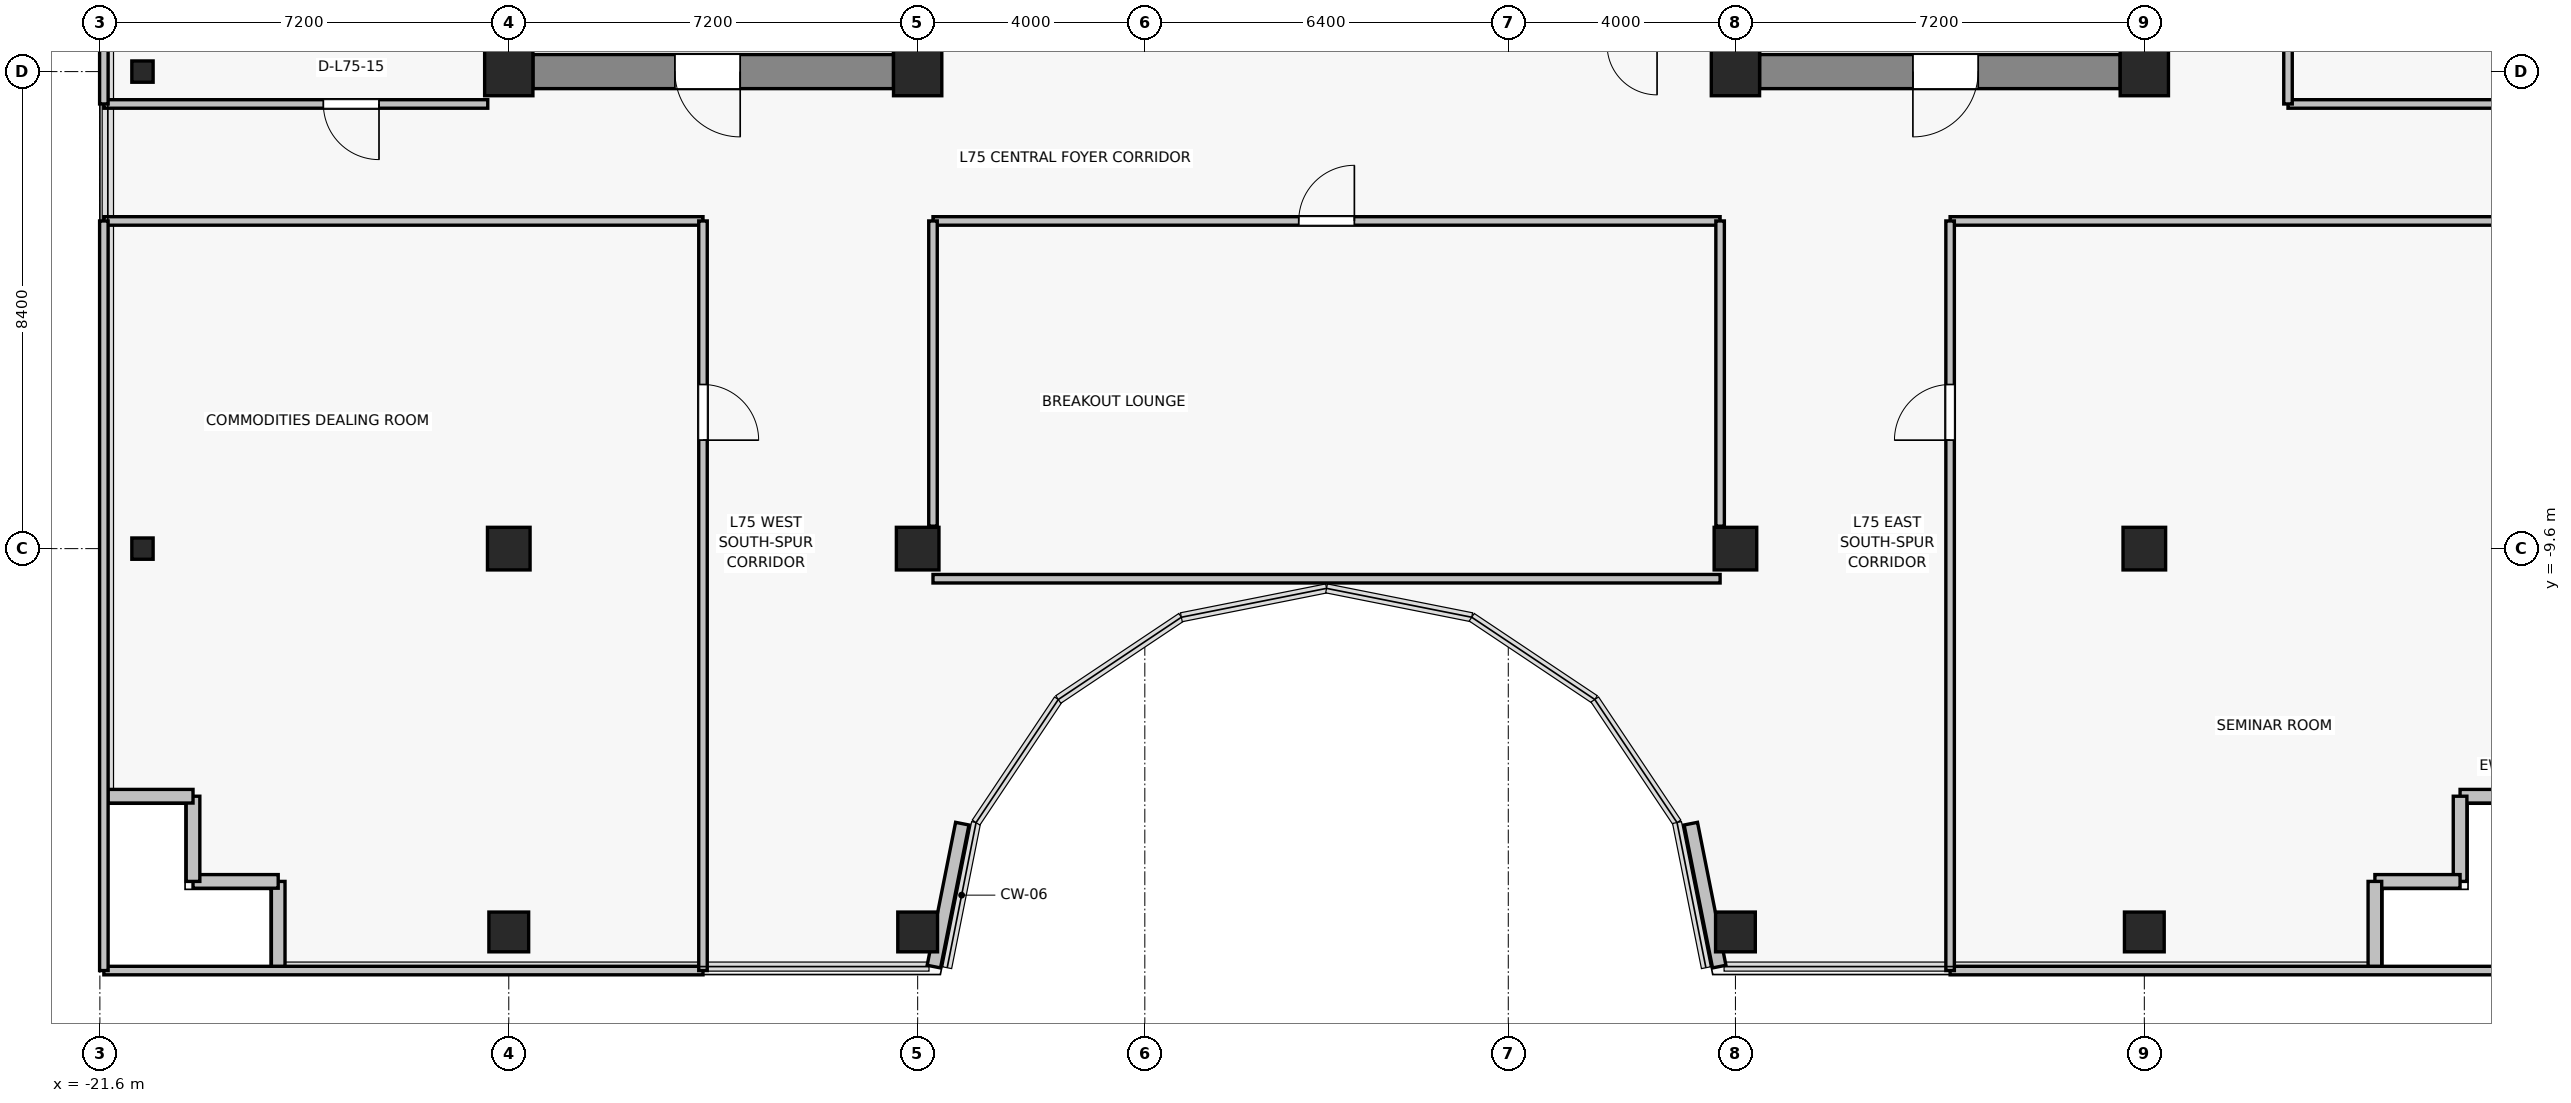
"""IFC4 building model, lengths in metres.
Left out: names, types, materials, properties, quantities, classifications, styles, units other than length and angle.
Written with IfcOpenShell. Run it as: python <this file> out.ifc"""

import sys

from ifc_helpers import new_model, si_unit, direction, frame, frame_2d, origin, origin_2d, place, context, subcontext, project, spatial, rectangle, i_section, extrude, source, transform, mapped, element, fill, save


model = new_model("IFC4")
c1 = context("Model", 3, precision=1e-05, world=origin(), true_north=direction((0.0, 1.0)))
c2 = subcontext(c1, "Body", "Model", "MODEL_VIEW")
j1 = project(units=[si_unit("LENGTHUNIT", "METRE"), si_unit("PLANEANGLEUNIT", "RADIAN")], contexts=[c1])
p1 = place(None, origin())
s1 = spatial("IfcSite", under=j1, at=p1, CompositionType="ELEMENT")
p2 = place(p1, origin())
s2 = spatial("IfcBuilding", under=s1, at=p2, CompositionType="ELEMENT")
p3 = place(p2, frame((0.0, 0.0, 265.0)))
s3 = spatial("IfcBuildingStorey", under=s2, at=p3, CompositionType="ELEMENT", Elevation=265.0)
for number, where, z_axis, x_axis in (
    (1, (-14.4, -1.2, 0.0), (0.0, 0.0, 1.0), (1.0, 0.0, 0.0)),
    (2, (-7.2, -1.2, 0.0), (0.0, 0.0, 1.0), (1.0, 0.0, 0.0)),
    (3, (7.2, -1.2, 0.0), (0.0, 0.0, 1.0), (1.0, 0.0, 0.0)),
    (4, (14.4, -1.2, 0.0), (0.0, 0.0, 1.0), (1.0, 0.0, 0.0)),
):
    element("IfcColumn", number, at=place(p3, frame(where, z_axis=z_axis, x_axis=x_axis)), inside=s3, PredefinedType="COLUMN", context=c2, shape_type="SweptSolid", body=[
        extrude(rectangle(XDim=0.85, YDim=0.85, at=origin_2d()), origin(), (0.0, 0.0, 1.0), 3.3),
    ])
for number, where, z_axis, x_axis in (
    (5, (-14.4, -9.6, 0.0), (0.0, 0.0, 1.0), (1.0, 0.0, 0.0)),
    (6, (-7.2, -9.6, 0.0), (0.0, 0.0, 1.0), (1.0, 0.0, 0.0)),
    (7, (7.2, -9.6, 0.0), (0.0, 0.0, 1.0), (1.0, 0.0, 0.0)),
    (8, (14.4, -9.6, 0.0), (0.0, 0.0, 1.0), (1.0, 0.0, 0.0)),
):
    element("IfcColumn", number, at=place(p3, frame(where, z_axis=z_axis, x_axis=x_axis)), inside=s3, PredefinedType="COLUMN", context=c2, shape_type="SweptSolid", body=[
        extrude(rectangle(XDim=0.75, YDim=0.75, at=origin_2d()), origin(), (0.0, 0.0, 1.0), 3.3),
    ])
for number, where, z_axis, x_axis in (
    (9, (-14.4, -16.35, 0.0), (0.0, 0.0, 1.0), (1.0, 0.0, 0.0)),
    (10, (-7.2, -16.35, 0.0), (0.0, 0.0, 1.0), (1.0, 0.0, 0.0)),
    (11, (7.2, -16.35, 0.0), (0.0, 0.0, 1.0), (1.0, 0.0, 0.0)),
    (12, (14.4, -16.35, 0.0), (0.0, 0.0, 1.0), (1.0, 0.0, 0.0)),
):
    element("IfcColumn", number, at=place(p3, frame(where, z_axis=z_axis, x_axis=x_axis)), inside=s3, PredefinedType="COLUMN", context=c2, shape_type="SweptSolid", body=[
        extrude(rectangle(XDim=0.7, YDim=0.7, at=origin_2d()), origin(), (0.0, 0.0, 1.0), 3.3),
    ])
for number, where, z_axis, x_axis in (
    (13, (-20.85, -9.6, 0.0), (0.0, 0.0, 1.0), (1.0, 0.0, 0.0)),
    (14, (-20.85, -1.2, 0.0), (0.0, 0.0, 1.0), (1.0, 0.0, 0.0)),
):
    element("IfcColumn", number, at=place(p3, frame(where, z_axis=z_axis, x_axis=x_axis)), inside=s3, PredefinedType="COLUMN", context=c2, shape_type="SweptSolid", body=[
        extrude(i_section(OverallWidth=0.375, OverallDepth=0.375, WebThickness=0.017, FlangeThickness=0.027, FilletRadius=0.015, at=origin_2d()), origin(), (0.0, 0.0, 1.0), 3.3),
    ])
p4 = place(p3, frame((-7.625, -1.2, 0.0), z_axis=(0.0, 0.0, 1.0), x_axis=(-1.0, 0.0, 0.0)))
e15 = element("IfcWall", 15, at=p4, inside=s3, PredefinedType="SHEAR", context=c2, shape_type="SweptSolid", body=[
    extrude(rectangle(XDim=6.35, YDim=0.6, at=frame_2d((3.175, 0.0))), origin(), (0.0, 0.0, 1.0), 3.075),
])
p5 = place(p4, frame((2.7, 0.0, 0.0)))
e16 = element("IfcOpeningElement", 16, at=p5, cuts=e15, PredefinedType="OPENING", context=c2, shape_type="SweptSolid", body=[
    extrude(rectangle(XDim=1.15, YDim=2.15, at=frame_2d((0.575, 1.075))), frame((0.0, 0.31, 0.0), z_axis=(0.0, -1.0, 0.0), x_axis=(1.0, 0.0, 0.0)), (0.0, 0.0, 1.0), 0.62),
])
p6 = place(p3, frame((13.975, -1.2, 0.0), z_axis=(0.0, 0.0, 1.0), x_axis=(-1.0, 0.0, 0.0)))
e17 = element("IfcWall", 17, at=p6, inside=s3, PredefinedType="SHEAR", context=c2, shape_type="SweptSolid", body=[
    extrude(rectangle(XDim=6.35, YDim=0.6, at=frame_2d((3.175, 0.0))), origin(), (0.0, 0.0, 1.0), 3.075),
])
p7 = place(p6, frame((2.5, 0.0, 0.0)))
e18 = element("IfcOpeningElement", 18, at=p7, cuts=e17, PredefinedType="OPENING", context=c2, shape_type="SweptSolid", body=[
    extrude(rectangle(XDim=1.15, YDim=2.15, at=frame_2d((0.575, 1.075))), frame((0.0, 0.31, 0.0), z_axis=(0.0, -1.0, 0.0), x_axis=(1.0, 0.0, 0.0)), (0.0, 0.0, 1.0), 0.62),
])
for number, where, z_axis, x_axis in (
    (19, (-7.4, -0.9, 0.0), (0.0, 0.0, 1.0), (0.0, 1.0, 0.0)),
    (20, (7.4, -0.9, 0.0), (0.0, 0.0, 1.0), (0.0, 1.0, 0.0)),
):
    element("IfcWall", number, at=place(p3, frame(where, z_axis=z_axis, x_axis=x_axis)), inside=s3, PredefinedType="SHEAR", context=c2, shape_type="SweptSolid", body=[
        extrude(rectangle(XDim=4.15, YDim=0.45, at=frame_2d((2.075, 0.0))), origin(), (0.0, 0.0, 1.0), 3.075),
    ])
for number, where, z_axis, x_axis in (
    (21, (19.96, -13.96, 0.0), (0.0, 0.0, 1.0), (1.0, 0.0, 0.0)),
    (22, (19.96, -15.46, 0.0), (0.0, 0.0, 1.0), (0.0, 1.0, 0.0)),
    (23, (18.46, -15.46, 0.0), (0.0, 0.0, 1.0), (1.0, 0.0, 0.0)),
    (24, (18.46, -16.96, 0.0), (0.0, 0.0, 1.0), (0.0, 1.0, 0.0)),
):
    element("IfcWall", number, at=place(p3, frame(where, z_axis=z_axis, x_axis=x_axis)), inside=s3, PredefinedType="SOLIDWALL", context=c2, shape_type="SweptSolid", body=[
        extrude(rectangle(XDim=1.5, YDim=0.24, at=frame_2d((0.75, 0.0))), origin(), (0.0, 0.0, 1.0), 3.075),
    ])
for number, where, z_axis, x_axis in (
    (25, (6.414, -14.443, 0.0), (0.0, 0.0, 1.0), (0.195, -0.981, 0.0)),
    (26, (-6.915, -16.96, 0.0), (0.0, 0.0, 1.0), (0.195, 0.981, 0.0)),
):
    element("IfcWall", number, at=place(p3, frame(where, z_axis=z_axis, x_axis=x_axis)), inside=s3, PredefinedType="SOLIDWALL", context=c2, shape_type="SweptSolid", body=[
        extrude(rectangle(XDim=2.566, YDim=0.24, at=frame_2d((1.283, 0.0))), origin(), (0.0, 0.0, 1.0), 3.075),
    ])
for number, where, z_axis, x_axis in (
    (27, (-18.46, -15.46, 0.0), (0.0, 0.0, 1.0), (0.0, -1.0, 0.0)),
    (28, (-19.96, -15.46, 0.0), (0.0, 0.0, 1.0), (1.0, 0.0, 0.0)),
    (29, (-19.96, -13.96, 0.0), (0.0, 0.0, 1.0), (0.0, -1.0, 0.0)),
    (30, (-21.46, -13.96, 0.0), (0.0, 0.0, 1.0), (1.0, 0.0, 0.0)),
):
    element("IfcWall", number, at=place(p3, frame(where, z_axis=z_axis, x_axis=x_axis)), inside=s3, PredefinedType="SOLIDWALL", context=c2, shape_type="SweptSolid", body=[
        extrude(rectangle(XDim=1.5, YDim=0.24, at=frame_2d((0.75, 0.0))), origin(), (0.0, 0.0, 1.0), 3.075),
    ])
p8 = place(p3, frame((-10.98, -17.03, 0.0), z_axis=(0.0, 0.0, 1.0), x_axis=(-1.0, 0.0, 0.0)))
e31 = element("IfcWall", 31, at=p8, inside=s3, PredefinedType="PARTITIONING", context=c2, shape_type="SweptSolid", body=[
    extrude(rectangle(XDim=10.55, YDim=0.15, at=frame_2d((5.275, 0.0))), origin(), (0.0, 0.0, 1.0), 3.075),
])
p9 = place(p3, frame((-21.53, -3.83, 0.0), z_axis=(0.0, 0.0, 1.0), x_axis=(1.0, 0.0, 0.0)))
e32 = element("IfcWall", 32, at=p9, inside=s3, PredefinedType="PARTITIONING", context=c2, shape_type="SweptSolid", body=[
    extrude(rectangle(XDim=10.55, YDim=0.15, at=frame_2d((5.275, 0.0))), origin(), (0.0, 0.0, 1.0), 2.615),
])
p10 = place(p3, frame((-21.53, -17.03, 0.0), z_axis=(0.0, 0.0, 1.0), x_axis=(0.0, 1.0, 0.0)))
e33 = element("IfcWall", 33, at=p10, inside=s3, PredefinedType="PARTITIONING", context=c2, shape_type="SweptSolid", body=[
    extrude(rectangle(XDim=13.2, YDim=0.15, at=frame_2d((6.6, 0.0))), origin(), (0.0, 0.0, 1.0), 2.665),
])
p11 = place(p3, frame((-10.98, -3.83, 0.0), z_axis=(0.0, 0.0, 1.0), x_axis=(0.0, -1.0, 0.0)))
e34 = element("IfcWall", 34, at=p11, inside=s3, PredefinedType="PARTITIONING", context=c2, shape_type="SweptSolid", body=[
    extrude(rectangle(XDim=13.2, YDim=0.15, at=frame_2d((6.6, 0.0))), origin(), (0.0, 0.0, 1.0), 2.615),
])
p12 = place(p11, frame((2.88, 0.0, 0.0)))
e35 = element("IfcOpeningElement", 35, at=p12, cuts=e34, PredefinedType="OPENING", context=c2, shape_type="SweptSolid", body=[
    extrude(rectangle(XDim=0.98, YDim=2.15, at=frame_2d((0.49, 1.075))), frame((0.0, 0.085, 0.0), z_axis=(0.0, -1.0, 0.0), x_axis=(1.0, 0.0, 0.0)), (0.0, 0.0, 1.0), 0.17),
])
p13 = place(p3, frame((21.53, -17.03, 0.0), z_axis=(0.0, 0.0, 1.0), x_axis=(-1.0, 0.0, 0.0)))
e36 = element("IfcWall", 36, at=p13, inside=s3, PredefinedType="PARTITIONING", context=c2, shape_type="SweptSolid", body=[
    extrude(rectangle(XDim=10.55, YDim=0.15, at=frame_2d((5.275, 0.0))), origin(), (0.0, 0.0, 1.0), 3.075),
])
p14 = place(p3, frame((10.98, -3.83, 0.0), z_axis=(0.0, 0.0, 1.0), x_axis=(1.0, 0.0, 0.0)))
e37 = element("IfcWall", 37, at=p14, inside=s3, PredefinedType="PARTITIONING", context=c2, shape_type="SweptSolid", body=[
    extrude(rectangle(XDim=10.55, YDim=0.15, at=frame_2d((5.275, 0.0))), origin(), (0.0, 0.0, 1.0), 2.615),
])
p15 = place(p3, frame((10.98, -17.03, 0.0), z_axis=(0.0, 0.0, 1.0), x_axis=(0.0, 1.0, 0.0)))
e38 = element("IfcWall", 38, at=p15, inside=s3, PredefinedType="PARTITIONING", context=c2, shape_type="SweptSolid", body=[
    extrude(rectangle(XDim=13.2, YDim=0.15, at=frame_2d((6.6, 0.0))), origin(), (0.0, 0.0, 1.0), 2.615),
])
p16 = place(p15, frame((9.34, 0.0, 0.0)))
e39 = element("IfcOpeningElement", 39, at=p16, cuts=e38, PredefinedType="OPENING", context=c2, shape_type="SweptSolid", body=[
    extrude(rectangle(XDim=0.98, YDim=2.15, at=frame_2d((0.49, 1.075))), frame((0.0, 0.085, 0.0), z_axis=(0.0, -1.0, 0.0), x_axis=(1.0, 0.0, 0.0)), (0.0, 0.0, 1.0), 0.17),
])
p17 = place(p3, frame((6.93, -10.13, 0.0), z_axis=(0.0, 0.0, 1.0), x_axis=(-1.0, 0.0, 0.0)))
e40 = element("IfcWall", 40, at=p17, inside=s3, PredefinedType="PARTITIONING", context=c2, shape_type="SweptSolid", body=[
    extrude(rectangle(XDim=13.86, YDim=0.15, at=frame_2d((6.93, 0.0))), origin(), (0.0, 0.0, 1.0), 2.615),
])
p18 = place(p3, frame((-6.93, -3.83, 0.0), z_axis=(0.0, 0.0, 1.0), x_axis=(1.0, 0.0, 0.0)))
e41 = element("IfcWall", 41, at=p18, inside=s3, PredefinedType="PARTITIONING", context=c2, shape_type="SweptSolid", body=[
    extrude(rectangle(XDim=13.86, YDim=0.15, at=frame_2d((6.93, 0.0))), origin(), (0.0, 0.0, 1.0), 2.615),
])
p19 = place(p18, frame((6.44, 0.0, 0.0)))
e42 = element("IfcOpeningElement", 42, at=p19, cuts=e41, PredefinedType="OPENING", context=c2, shape_type="SweptSolid", body=[
    extrude(rectangle(XDim=0.98, YDim=2.15, at=frame_2d((0.49, 1.075))), frame((0.0, 0.085, 0.0), z_axis=(0.0, -1.0, 0.0), x_axis=(1.0, 0.0, 0.0)), (0.0, 0.0, 1.0), 0.17),
])
for number, where, z_axis, x_axis in (
    (43, (-6.93, -9.205, 0.0), (0.0, 0.0, 1.0), (0.0, 1.0, 0.0)),
    (44, (6.93, -3.83, 0.0), (0.0, 0.0, 1.0), (0.0, -1.0, 0.0)),
):
    element("IfcWall", number, at=place(p3, frame(where, z_axis=z_axis, x_axis=x_axis)), inside=s3, PredefinedType="PARTITIONING", context=c2, shape_type="SweptSolid", body=[
        extrude(rectangle(XDim=5.375, YDim=0.15, at=frame_2d((2.688, 0.0))), origin(), (0.0, 0.0, 1.0), 2.615),
    ])
p20 = place(p3, frame((-14.77, -1.77, 0.0), z_axis=(0.0, 0.0, 1.0), x_axis=(-1.0, 0.0, 0.0)))
e45 = element("IfcWall", 45, at=p20, inside=s3, PredefinedType="PARTITIONING", context=c2, shape_type="SweptSolid", body=[
    extrude(rectangle(XDim=6.76, YDim=0.15, at=frame_2d((3.38, 0.0))), origin(), (0.0, 0.0, 1.0), 2.765),
])
p21 = place(p20, frame((1.915, 0.0, 0.0)))
e46 = element("IfcOpeningElement", 46, at=p21, cuts=e45, PredefinedType="OPENING", context=c2, shape_type="SweptSolid", body=[
    extrude(rectangle(XDim=0.98, YDim=2.15, at=frame_2d((0.49, 1.075))), frame((0.0, 0.085, 0.0), z_axis=(0.0, -1.0, 0.0), x_axis=(1.0, 0.0, 0.0)), (0.0, 0.0, 1.0), 0.17),
])
p22 = place(p3, frame((-21.53, -1.77, 0.0), z_axis=(0.0, 0.0, 1.0), x_axis=(0.0, 1.0, 0.0)))
e47 = element("IfcWall", 47, at=p22, inside=s3, PredefinedType="PARTITIONING", context=c2, shape_type="SweptSolid", body=[
    extrude(rectangle(XDim=15.65, YDim=0.15, at=frame_2d((7.825, 0.0))), origin(), (0.0, 0.0, 1.0), 3.075),
])
p23 = place(p3, frame((21.53, -1.77, 0.0), z_axis=(0.0, 0.0, 1.0), x_axis=(-1.0, 0.0, 0.0)))
e48 = element("IfcWall", 48, at=p23, inside=s3, PredefinedType="PARTITIONING", context=c2, shape_type="SweptSolid", body=[
    extrude(rectangle(XDim=4.6, YDim=0.15, at=frame_2d((2.3, 0.0))), origin(), (0.0, 0.0, 1.0), 2.765),
])
p24 = place(p3, frame((16.93, -1.77, 0.0), z_axis=(0.0, 0.0, 1.0), x_axis=(0.0, 1.0, 0.0)))
e49 = element("IfcWall", 49, at=p24, inside=s3, PredefinedType="PARTITIONING", context=c2, shape_type="SweptSolid", body=[
    extrude(rectangle(XDim=15.65, YDim=0.15, at=frame_2d((7.825, 0.0))), origin(), (0.0, 0.0, 1.0), 2.615),
])
p25 = place(p24, frame((7.335, 0.0, 0.0)))
e50 = element("IfcOpeningElement", 50, at=p25, cuts=e49, PredefinedType="OPENING", context=c2, shape_type="SweptSolid", body=[
    extrude(rectangle(XDim=0.98, YDim=2.15, at=frame_2d((0.49, 1.075))), frame((0.0, 0.085, 0.0), z_axis=(0.0, -1.0, 0.0), x_axis=(1.0, 0.0, 0.0)), (0.0, 0.0, 1.0), 0.17),
])
m1 = source(origin(), c2, "Body", "SweptSolid", [
    extrude(rectangle(XDim=1.15, YDim=2.15, at=frame_2d((0.575, 1.075))), frame((0.0, 0.025, 0.0), z_axis=(0.0, -1.0, 0.0), x_axis=(1.0, 0.0, 0.0)), (0.0, 0.0, 1.0), 0.05),
])
p26 = place(p5, origin())
e51 = element("IfcDoor", 51, at=p26, inside=s3, OperationType="SINGLE_SWING_LEFT", PredefinedType="DOOR", context=c2, shape_type="MappedRepresentation", body=[
    mapped(m1, transform((0.0, 0.0, 0.0), x_axis=(1.0, 0.0, 0.0), y_axis=(0.0, 1.0, 0.0), z_axis=(0.0, 0.0, 1.0), scale=1.0)),
])
fill(e16, e51)
p27 = place(p7, origin())
e52 = element("IfcDoor", 52, at=p27, inside=s3, OperationType="SINGLE_SWING_RIGHT", PredefinedType="DOOR", context=c2, shape_type="MappedRepresentation", body=[
    mapped(m1, transform((0.0, 0.0, 0.0), x_axis=(1.0, 0.0, 0.0), y_axis=(0.0, 1.0, 0.0), z_axis=(0.0, 0.0, 1.0), scale=1.0)),
])
fill(e18, e52)
m2 = source(origin(), c2, "Body", "SweptSolid", [
    extrude(rectangle(XDim=0.98, YDim=2.15, at=frame_2d((0.49, 1.075))), frame((0.0, 0.025, 0.0), z_axis=(0.0, -1.0, 0.0), x_axis=(1.0, 0.0, 0.0)), (0.0, 0.0, 1.0), 0.05),
])
p28 = place(p12, origin())
e53 = element("IfcDoor", 53, at=p28, inside=s3, OperationType="SINGLE_SWING_RIGHT", PredefinedType="DOOR", context=c2, shape_type="MappedRepresentation", body=[
    mapped(m2, transform((0.0, 0.0, 0.0), x_axis=(1.0, 0.0, 0.0), y_axis=(0.0, 1.0, 0.0), z_axis=(0.0, 0.0, 1.0), scale=1.0)),
])
fill(e35, e53)
p29 = place(p16, origin())
e54 = element("IfcDoor", 54, at=p29, inside=s3, OperationType="SINGLE_SWING_LEFT", PredefinedType="DOOR", context=c2, shape_type="MappedRepresentation", body=[
    mapped(m2, transform((0.0, 0.0, 0.0), x_axis=(1.0, 0.0, 0.0), y_axis=(0.0, 1.0, 0.0), z_axis=(0.0, 0.0, 1.0), scale=1.0)),
])
fill(e39, e54)
p30 = place(p19, origin())
e55 = element("IfcDoor", 55, at=p30, inside=s3, OperationType="SINGLE_SWING_RIGHT", PredefinedType="DOOR", context=c2, shape_type="MappedRepresentation", body=[
    mapped(m2, transform((0.0, 0.0, 0.0), x_axis=(1.0, 0.0, 0.0), y_axis=(0.0, 1.0, 0.0), z_axis=(0.0, 0.0, 1.0), scale=1.0)),
])
fill(e42, e55)
p31 = place(p21, origin())
e56 = element("IfcDoor", 56, at=p31, inside=s3, OperationType="SINGLE_SWING_LEFT", PredefinedType="DOOR", context=c2, shape_type="MappedRepresentation", body=[
    mapped(m2, transform((0.0, 0.0, 0.0), x_axis=(1.0, 0.0, 0.0), y_axis=(0.0, 1.0, 0.0), z_axis=(0.0, 0.0, 1.0), scale=1.0)),
])
fill(e46, e56)
save(model, sys.argv[1])
